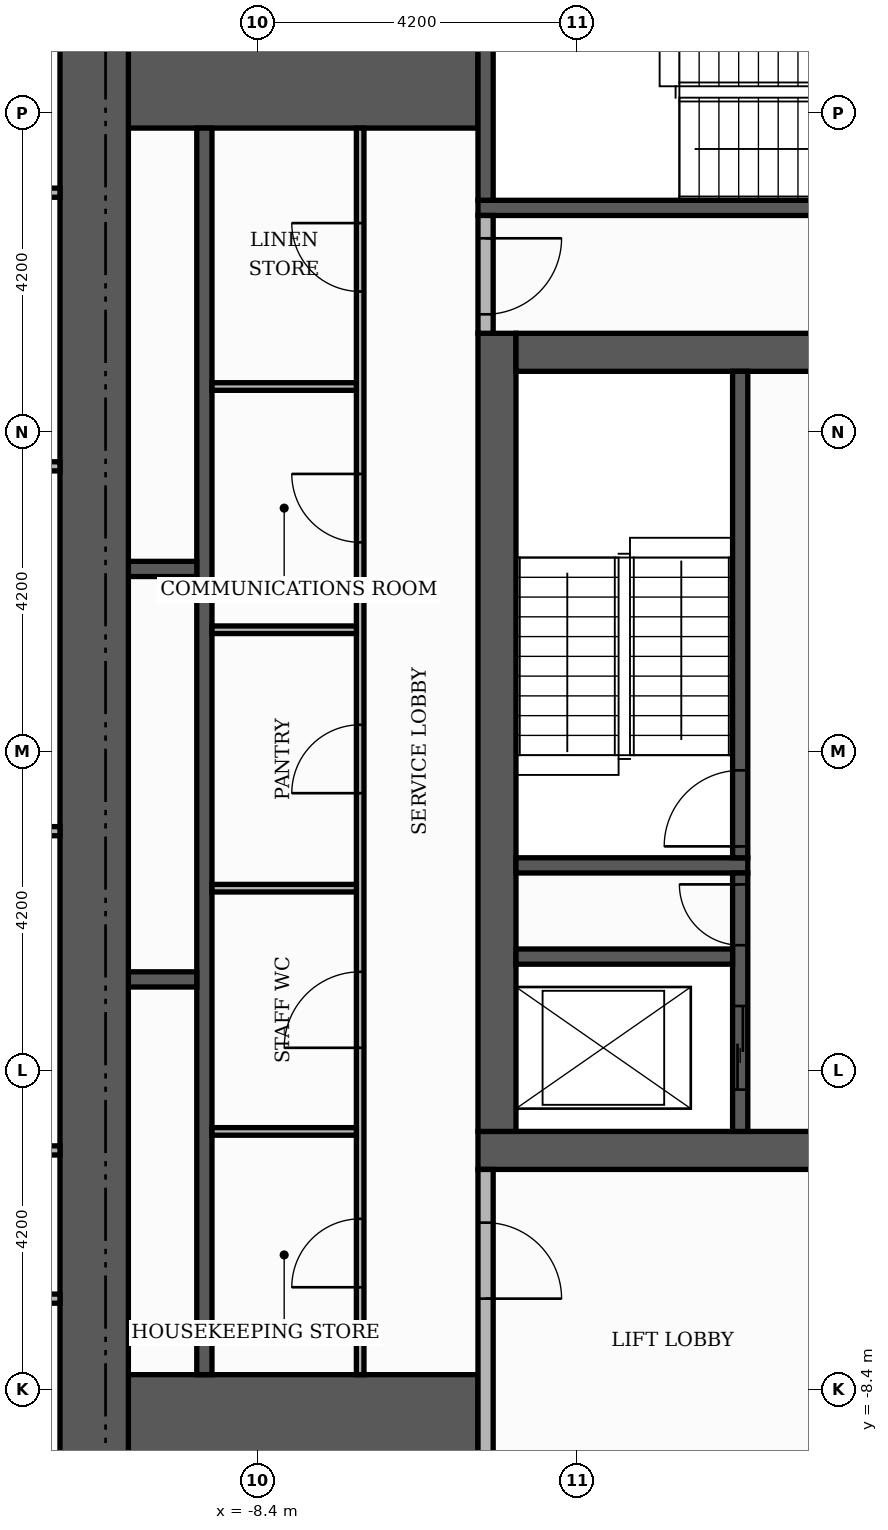
"""IFC4 building model, lengths in metres.
Left out: names, types, materials, properties, quantities, classifications, styles, units other than length and angle.
Written with IfcOpenShell. Run it as: python <this file> out.ifc"""

import sys

from ifc_helpers import new_model, si_unit, direction, frame, frame_2d, origin, place, context, subcontext, project, spatial, rectangle, extrude, element, fill, save


model = new_model("IFC4")
c1 = context("Model", 3, precision=1e-05, world=origin(), true_north=direction((0.0, 1.0)))
c2 = subcontext(c1, "Body", "Model", "MODEL_VIEW")
j1 = project(units=[si_unit("LENGTHUNIT", "METRE"), si_unit("PLANEANGLEUNIT", "RADIAN")], contexts=[c1])
p1 = place(None, origin())
s1 = spatial("IfcSite", under=j1, at=p1, CompositionType="ELEMENT")
p2 = place(p1, origin())
s2 = spatial("IfcBuilding", under=s1, at=p2, CompositionType="ELEMENT")
p3 = place(p2, frame((0.0, 0.0, 240.6)))
s3 = spatial("IfcBuildingStorey", under=s2, at=p3, CompositionType="ELEMENT", Elevation=240.6)
p4 = place(p3, frame((-5.5, -5.25, 0.0), z_axis=(0.0, 0.0, 1.0), x_axis=(1.0, 0.0, 0.0)))
e1 = element("IfcWall", 1, at=p4, inside=s3, PredefinedType="SHEAR", context=c2, shape_type="SweptSolid", body=[
    extrude(rectangle(XDim=11.0, YDim=0.5, at=frame_2d((5.5, 0.0))), origin(), (0.0, 0.0, 1.0), 3.48),
])
p5 = place(p4, frame((4.9, 0.0, 0.0)))
e2 = element("IfcOpeningElement", 2, at=p5, cuts=e1, PredefinedType="OPENING", context=c2, shape_type="SweptSolid", body=[
    extrude(rectangle(XDim=1.2, YDim=2.1, at=frame_2d((0.6, 1.05))), frame((0.0, 0.26, 0.0), z_axis=(0.0, -1.0, 0.0), x_axis=(1.0, 0.0, 0.0)), (0.0, 0.0, 1.0), 0.52),
])
p6 = place(p3, frame((-5.25, -5.0, 0.0), z_axis=(0.0, 0.0, 1.0), x_axis=(0.0, 1.0, 0.0)))
e3 = element("IfcWall", 3, at=p6, inside=s3, PredefinedType="SHEAR", context=c2, shape_type="SweptSolid", body=[
    extrude(rectangle(XDim=10.5, YDim=0.5, at=frame_2d((5.25, 0.0))), origin(), (0.0, 0.0, 1.0), 3.48),
])
p7 = place(p3, frame((-5.0, 5.25, 0.0), z_axis=(0.0, 0.0, 1.0), x_axis=(1.0, 0.0, 0.0)))
e4 = element("IfcWall", 4, at=p7, inside=s3, PredefinedType="SHEAR", context=c2, shape_type="SweptSolid", body=[
    extrude(rectangle(XDim=10.0, YDim=0.5, at=frame_2d((5.0, 0.0))), origin(), (0.0, 0.0, 1.0), 3.48),
])
p8 = place(p7, frame((4.4, 0.0, 0.0)))
e5 = element("IfcOpeningElement", 5, at=p8, cuts=e4, PredefinedType="OPENING", context=c2, shape_type="SweptSolid", body=[
    extrude(rectangle(XDim=1.2, YDim=2.1, at=frame_2d((0.6, 1.05))), frame((0.0, 0.26, 0.0), z_axis=(0.0, -1.0, 0.0), x_axis=(1.0, 0.0, 0.0)), (0.0, 0.0, 1.0), 0.52),
])
for number, where, z_axis, x_axis in (
    (6, (-10.1, -9.15, 0.0), (0.0, 0.0, 1.0), (1.0, 0.0, 0.0)),
    (7, (-10.1, 9.15, 0.0), (0.0, 0.0, 1.0), (1.0, 0.0, 0.0)),
):
    element("IfcWall", number, at=place(p3, frame(where, z_axis=z_axis, x_axis=x_axis)), inside=s3, PredefinedType="SHEAR", context=c2, shape_type="SweptSolid", body=[
        extrude(rectangle(XDim=4.6, YDim=1.9, at=frame_2d((2.3, 0.0))), origin(), (0.0, 0.0, 1.0), 3.48),
    ])
p9 = place(p3, frame((-5.0, -1.5, 0.0), z_axis=(0.0, 0.0, 1.0), x_axis=(1.0, 0.0, 0.0)))
e8 = element("IfcWall", 8, at=p9, inside=s3, PredefinedType="SHEAR", context=c2, shape_type="SweptSolid", body=[
    extrude(rectangle(XDim=3.05, YDim=0.2, at=frame_2d((1.525, 0.0))), origin(), (0.0, 0.0, 1.0), 3.48),
])
p10 = place(p3, frame((-2.05, -1.4, 0.0), z_axis=(0.0, 0.0, 1.0), x_axis=(0.0, 1.0, 0.0)))
e9 = element("IfcWall", 9, at=p10, inside=s3, PredefinedType="SHEAR", context=c2, shape_type="SweptSolid", body=[
    extrude(rectangle(XDim=6.4, YDim=0.2, at=frame_2d((3.2, 0.0))), origin(), (0.0, 0.0, 1.0), 3.48),
])
p11 = place(p10, frame((0.15, 0.0, 0.0)))
e10 = element("IfcOpeningElement", 10, at=p11, cuts=e9, PredefinedType="OPENING", context=c2, shape_type="SweptSolid", body=[
    extrude(rectangle(XDim=1.0, YDim=2.1, at=frame_2d((0.5, 1.05))), frame((0.0, 0.11, 0.0), z_axis=(0.0, -1.0, 0.0), x_axis=(1.0, 0.0, 0.0)), (0.0, 0.0, 1.0), 0.22),
])
p12 = place(p3, frame((-5.5, 7.15, 0.0), z_axis=(0.0, 0.0, 1.0), x_axis=(1.0, 0.0, 0.0)))
e11 = element("IfcWall", 11, at=p12, inside=s3, PredefinedType="SHEAR", context=c2, shape_type="SweptSolid", body=[
    extrude(rectangle(XDim=6.8, YDim=0.2, at=frame_2d((3.4, 0.0))), origin(), (0.0, 0.0, 1.0), 3.48),
])
p13 = place(p3, frame((-5.4, 7.25, 0.0), z_axis=(0.0, 0.0, 1.0), x_axis=(0.0, 1.0, 0.0)))
e12 = element("IfcWall", 12, at=p13, inside=s3, PredefinedType="SHEAR", context=c2, shape_type="SweptSolid", body=[
    extrude(rectangle(XDim=2.85, YDim=0.2, at=frame_2d((1.425, 0.0))), origin(), (0.0, 0.0, 1.0), 3.48),
])
p14 = place(p3, frame((-9.1, -8.2, 0.0), z_axis=(0.0, 0.0, 1.0), x_axis=(0.0, 1.0, 0.0)))
e13 = element("IfcWall", 13, at=p14, inside=s3, PredefinedType="SHEAR", context=c2, shape_type="SweptSolid", body=[
    extrude(rectangle(XDim=16.4, YDim=0.2, at=frame_2d((8.2, 0.0))), origin(), (0.0, 0.0, 1.0), 3.48),
])
p15 = place(p3, frame((-2.05, -5.0, 0.0), z_axis=(0.0, 0.0, 1.0), x_axis=(0.0, 1.0, 0.0)))
e14 = element("IfcWall", 14, at=p15, inside=s3, PredefinedType="SHEAR", context=c2, shape_type="SweptSolid", body=[
    extrude(rectangle(XDim=3.4, YDim=0.2, at=frame_2d((1.7, 0.0))), origin(), (0.0, 0.0, 1.0), 3.48),
])
p16 = place(p15, frame((0.55, 0.0, 0.0)))
e15 = element("IfcOpeningElement", 15, at=p16, cuts=e14, PredefinedType="OPENING", context=c2, shape_type="SweptSolid", body=[
    extrude(rectangle(XDim=1.1, YDim=2.1, at=frame_2d((0.55, 1.05))), frame((0.0, 0.11, 0.0), z_axis=(0.0, -1.0, 0.0), x_axis=(1.0, 0.0, 0.0)), (0.0, 0.0, 1.0), 0.22),
])
p17 = place(p15, frame((2.45, 0.0, 0.0)))
e16 = element("IfcOpeningElement", 16, at=p17, cuts=e14, PredefinedType="OPENING", context=c2, shape_type="SweptSolid", body=[
    extrude(rectangle(XDim=0.8, YDim=2.1, at=frame_2d((0.4, 1.05))), frame((0.0, 0.11, 0.0), z_axis=(0.0, -1.0, 0.0), x_axis=(1.0, 0.0, 0.0)), (0.0, 0.0, 1.0), 0.22),
])
p18 = place(p3, frame((-10.1, -3.0, 0.0), z_axis=(0.0, 0.0, 1.0), x_axis=(1.0, 0.0, 0.0)))
e17 = element("IfcWall", 17, at=p18, inside=s3, PredefinedType="SHEAR", context=c2, shape_type="SweptSolid", body=[
    extrude(rectangle(XDim=0.9, YDim=0.2, at=frame_2d((0.45, 0.0))), origin(), (0.0, 0.0, 1.0), 3.48),
])
p19 = place(p3, frame((-5.0, -2.7, 0.0), z_axis=(0.0, 0.0, 1.0), x_axis=(1.0, 0.0, 0.0)))
e18 = element("IfcWall", 18, at=p19, inside=s3, PredefinedType="SHEAR", context=c2, shape_type="SweptSolid", body=[
    extrude(rectangle(XDim=2.85, YDim=0.2, at=frame_2d((1.425, 0.0))), origin(), (0.0, 0.0, 1.0), 3.48),
])
p20 = place(p3, frame((-10.1, 2.4, 0.0), z_axis=(0.0, 0.0, 1.0), x_axis=(1.0, 0.0, 0.0)))
e19 = element("IfcWall", 19, at=p20, inside=s3, PredefinedType="SHEAR", context=c2, shape_type="SweptSolid", body=[
    extrude(rectangle(XDim=0.9, YDim=0.2, at=frame_2d((0.45, 0.0))), origin(), (0.0, 0.0, 1.0), 3.48),
])
p21 = place(p3, frame((-10.55, -10.1, 0.0), z_axis=(0.0, 0.0, 1.0), x_axis=(0.0, 1.0, 0.0)))
e20 = element("IfcWall", 20, at=p21, inside=s3, PredefinedType="SHEAR", context=c2, shape_type="SweptSolid", body=[
    extrude(rectangle(XDim=20.2, YDim=0.9, at=frame_2d((10.1, 0.0))), origin(), (0.0, 0.0, 1.0), 3.48),
])
p22 = place(p3, frame((-5.4, -10.1, 0.0), z_axis=(0.0, 0.0, 1.0), x_axis=(0.0, 1.0, 0.0)))
e21 = element("IfcWall", 21, at=p22, inside=s3, PredefinedType="PARTITIONING", context=c2, shape_type="SweptSolid", body=[
    extrude(rectangle(XDim=4.6, YDim=0.2, at=frame_2d((2.3, 0.0))), origin(), (0.0, 0.0, 1.0), 3.48),
])
p23 = place(p22, frame((2.9, 0.0, 0.0)))
e22 = element("IfcOpeningElement", 22, at=p23, cuts=e21, PredefinedType="OPENING", context=c2, shape_type="SweptSolid", body=[
    extrude(rectangle(XDim=1.0, YDim=2.1, at=frame_2d((0.5, 1.05))), frame((0.0, 0.11, 0.0), z_axis=(0.0, -1.0, 0.0), x_axis=(1.0, 0.0, 0.0)), (0.0, 0.0, 1.0), 0.22),
])
p24 = place(p3, frame((-7.05, -8.2, 0.0), z_axis=(0.0, 0.0, 1.0), x_axis=(0.0, 1.0, 0.0)))
e23 = element("IfcWall", 23, at=p24, inside=s3, PredefinedType="PARTITIONING", context=c2, shape_type="SweptSolid", body=[
    extrude(rectangle(XDim=16.4, YDim=0.1, at=frame_2d((8.2, 0.0))), origin(), (0.0, 0.0, 1.0), 3.48),
])
p25 = place(p24, frame((1.15, 0.0, 0.0)))
e24 = element("IfcOpeningElement", 24, at=p25, cuts=e23, PredefinedType="OPENING", context=c2, shape_type="SweptSolid", body=[
    extrude(rectangle(XDim=0.9, YDim=2.1, at=frame_2d((0.45, 1.05))), frame((0.0, 0.06, 0.0), z_axis=(0.0, -1.0, 0.0), x_axis=(1.0, 0.0, 0.0)), (0.0, 0.0, 1.0), 0.12),
])
p26 = place(p24, frame((4.3, 0.0, 0.0)))
e25 = element("IfcOpeningElement", 25, at=p26, cuts=e23, PredefinedType="OPENING", context=c2, shape_type="SweptSolid", body=[
    extrude(rectangle(XDim=1.0, YDim=2.1, at=frame_2d((0.5, 1.05))), frame((0.0, 0.06, 0.0), z_axis=(0.0, -1.0, 0.0), x_axis=(1.0, 0.0, 0.0)), (0.0, 0.0, 1.0), 0.12),
])
p27 = place(p24, frame((7.65, 0.0, 0.0)))
e26 = element("IfcOpeningElement", 26, at=p27, cuts=e23, PredefinedType="OPENING", context=c2, shape_type="SweptSolid", body=[
    extrude(rectangle(XDim=0.9, YDim=2.1, at=frame_2d((0.45, 1.05))), frame((0.0, 0.06, 0.0), z_axis=(0.0, -1.0, 0.0), x_axis=(1.0, 0.0, 0.0)), (0.0, 0.0, 1.0), 0.12),
])
p28 = place(p24, frame((10.95, 0.0, 0.0)))
e27 = element("IfcOpeningElement", 27, at=p28, cuts=e23, PredefinedType="OPENING", context=c2, shape_type="SweptSolid", body=[
    extrude(rectangle(XDim=0.9, YDim=2.1, at=frame_2d((0.45, 1.05))), frame((0.0, 0.06, 0.0), z_axis=(0.0, -1.0, 0.0), x_axis=(1.0, 0.0, 0.0)), (0.0, 0.0, 1.0), 0.12),
])
p29 = place(p24, frame((14.25, 0.0, 0.0)))
e28 = element("IfcOpeningElement", 28, at=p29, cuts=e23, PredefinedType="OPENING", context=c2, shape_type="SweptSolid", body=[
    extrude(rectangle(XDim=0.9, YDim=2.1, at=frame_2d((0.45, 1.05))), frame((0.0, 0.06, 0.0), z_axis=(0.0, -1.0, 0.0), x_axis=(1.0, 0.0, 0.0)), (0.0, 0.0, 1.0), 0.12),
])
for number, where, z_axis, x_axis in (
    (29, (-9.0, -5.0, 0.0), (0.0, 0.0, 1.0), (1.0, 0.0, 0.0)),
    (30, (-9.0, -1.8, 0.0), (0.0, 0.0, 1.0), (1.0, 0.0, 0.0)),
    (31, (-9.0, 1.6, 0.0), (0.0, 0.0, 1.0), (1.0, 0.0, 0.0)),
    (32, (-9.0, 4.8, 0.0), (0.0, 0.0, 1.0), (1.0, 0.0, 0.0)),
):
    element("IfcWall", number, at=place(p3, frame(where, z_axis=z_axis, x_axis=x_axis)), inside=s3, PredefinedType="PARTITIONING", context=c2, shape_type="SweptSolid", body=[
        extrude(rectangle(XDim=1.9, YDim=0.1, at=frame_2d((0.95, 0.0))), origin(), (0.0, 0.0, 1.0), 3.48),
    ])
p30 = place(p3, frame((-5.4, 5.5, 0.0), z_axis=(0.0, 0.0, 1.0), x_axis=(0.0, 1.0, 0.0)))
e33 = element("IfcWall", 33, at=p30, inside=s3, PredefinedType="PARTITIONING", context=c2, shape_type="SweptSolid", body=[
    extrude(rectangle(XDim=1.55, YDim=0.2, at=frame_2d((0.775, 0.0))), origin(), (0.0, 0.0, 1.0), 3.48),
])
p31 = place(p30, frame((0.25, 0.0, 0.0)))
e34 = element("IfcOpeningElement", 34, at=p31, cuts=e33, PredefinedType="OPENING", context=c2, shape_type="SweptSolid", body=[
    extrude(rectangle(XDim=1.0, YDim=2.1, at=frame_2d((0.5, 1.05))), frame((0.0, 0.11, 0.0), z_axis=(0.0, -1.0, 0.0), x_axis=(1.0, 0.0, 0.0)), (0.0, 0.0, 1.0), 0.22),
])
for number, where, z_axis, x_axis in (
    (35, (-18.32, -7.2, 0.0), (0.0, 0.0, 1.0), (1.0, 0.0, 0.0)),
    (36, (-18.32, -5.25, 0.0), (0.0, 0.0, 1.0), (1.0, 0.0, 0.0)),
    (37, (-18.32, -1.05, 0.0), (0.0, 0.0, 1.0), (1.0, 0.0, 0.0)),
    (38, (-18.32, 3.75, 0.0), (0.0, 0.0, 1.0), (1.0, 0.0, 0.0)),
):
    element("IfcWall", number, at=place(p3, frame(where, z_axis=z_axis, x_axis=x_axis)), inside=s3, PredefinedType="PARTITIONING", context=c2, shape_type="SweptSolid", body=[
        extrude(rectangle(XDim=7.32, YDim=0.12, at=frame_2d((3.66, 0.0))), origin(), (0.0, 0.0, 1.0), 3.48),
    ])
p32 = place(p3, frame((-18.32, 7.35, 0.0), z_axis=(0.0, 0.0, 1.0), x_axis=(1.0, 0.0, 0.0)))
e39 = element("IfcWall", 39, at=p32, inside=s3, PredefinedType="PARTITIONING", context=c2, shape_type="SweptSolid", body=[
    extrude(rectangle(XDim=7.32, YDim=0.12, at=frame_2d((3.66, 0.0))), origin(), (0.0, 0.0, 1.0), 3.48),
])
p33 = place(p32, frame((3.21, 0.0, 0.0)))
e40 = element("IfcOpeningElement", 40, at=p33, cuts=e39, PredefinedType="OPENING", context=c2, shape_type="SweptSolid", body=[
    extrude(rectangle(XDim=0.9, YDim=2.1, at=frame_2d((0.45, 1.05))), frame((0.0, 0.07, 0.0), z_axis=(0.0, -1.0, 0.0), x_axis=(1.0, 0.0, 0.0)), (0.0, 0.0, 1.0), 0.14),
])
p34 = place(p16, origin())
e41 = element("IfcDoor", 41, at=p34, inside=s3, OperationType="SLIDING_TO_LEFT", PredefinedType="DOOR", context=c2, shape_type="SweptSolid", body=[
    extrude(rectangle(XDim=1.1, YDim=2.1, at=frame_2d((0.55, 1.05))), frame((0.0, 0.025, 0.0), z_axis=(0.0, -1.0, 0.0), x_axis=(1.0, 0.0, 0.0)), (0.0, 0.0, 1.0), 0.05),
])
fill(e15, e41)
p35 = place(p11, origin())
e42 = element("IfcDoor", 42, at=p35, inside=s3, OperationType="SINGLE_SWING_LEFT", PredefinedType="DOOR", context=c2, shape_type="SweptSolid", body=[
    extrude(rectangle(XDim=1.0, YDim=2.1, at=frame_2d((0.5, 1.05))), frame((0.0, 0.025, 0.0), z_axis=(0.0, -1.0, 0.0), x_axis=(1.0, 0.0, 0.0)), (0.0, 0.0, 1.0), 0.05),
])
fill(e10, e42)
p36 = place(p17, origin())
e43 = element("IfcDoor", 43, at=p36, inside=s3, OperationType="SINGLE_SWING_RIGHT", PredefinedType="DOOR", context=c2, shape_type="SweptSolid", body=[
    extrude(rectangle(XDim=0.8, YDim=2.1, at=frame_2d((0.4, 1.05))), frame((0.0, 0.025, 0.0), z_axis=(0.0, -1.0, 0.0), x_axis=(1.0, 0.0, 0.0)), (0.0, 0.0, 1.0), 0.05),
])
fill(e16, e43)
p37 = place(p31, frame((1.0, 0.0, 0.0), z_axis=(0.0, 0.0, 1.0), x_axis=(-1.0, 0.0, 0.0)))
e44 = element("IfcDoor", 44, at=p37, inside=s3, OperationType="SINGLE_SWING_RIGHT", PredefinedType="DOOR", context=c2, shape_type="SweptSolid", body=[
    extrude(rectangle(XDim=1.0, YDim=2.1, at=frame_2d((0.5, 1.05))), frame((0.0, 0.025, 0.0), z_axis=(0.0, -1.0, 0.0), x_axis=(1.0, 0.0, 0.0)), (0.0, 0.0, 1.0), 0.05),
])
fill(e34, e44)
p38 = place(p23, frame((1.0, 0.0, 0.0), z_axis=(0.0, 0.0, 1.0), x_axis=(-1.0, 0.0, 0.0)))
e45 = element("IfcDoor", 45, at=p38, inside=s3, OperationType="SINGLE_SWING_LEFT", PredefinedType="DOOR", context=c2, shape_type="SweptSolid", body=[
    extrude(rectangle(XDim=1.0, YDim=2.1, at=frame_2d((0.5, 1.05))), frame((0.0, 0.025, 0.0), z_axis=(0.0, -1.0, 0.0), x_axis=(1.0, 0.0, 0.0)), (0.0, 0.0, 1.0), 0.05),
])
fill(e22, e45)
p39 = place(p25, origin())
e46 = element("IfcDoor", 46, at=p39, inside=s3, OperationType="SINGLE_SWING_LEFT", PredefinedType="DOOR", context=c2, shape_type="SweptSolid", body=[
    extrude(rectangle(XDim=0.9, YDim=2.1, at=frame_2d((0.45, 1.05))), frame((0.0, 0.025, 0.0), z_axis=(0.0, -1.0, 0.0), x_axis=(1.0, 0.0, 0.0)), (0.0, 0.0, 1.0), 0.05),
])
fill(e24, e46)
p40 = place(p26, origin())
e47 = element("IfcDoor", 47, at=p40, inside=s3, OperationType="SINGLE_SWING_LEFT", PredefinedType="DOOR", context=c2, shape_type="SweptSolid", body=[
    extrude(rectangle(XDim=1.0, YDim=2.1, at=frame_2d((0.5, 1.05))), frame((0.0, 0.025, 0.0), z_axis=(0.0, -1.0, 0.0), x_axis=(1.0, 0.0, 0.0)), (0.0, 0.0, 1.0), 0.05),
])
fill(e25, e47)
p41 = place(p27, origin())
e48 = element("IfcDoor", 48, at=p41, inside=s3, OperationType="SINGLE_SWING_LEFT", PredefinedType="DOOR", context=c2, shape_type="SweptSolid", body=[
    extrude(rectangle(XDim=0.9, YDim=2.1, at=frame_2d((0.45, 1.05))), frame((0.0, 0.025, 0.0), z_axis=(0.0, -1.0, 0.0), x_axis=(1.0, 0.0, 0.0)), (0.0, 0.0, 1.0), 0.05),
])
fill(e26, e48)
p42 = place(p28, origin())
e49 = element("IfcDoor", 49, at=p42, inside=s3, OperationType="SINGLE_SWING_RIGHT", PredefinedType="DOOR", context=c2, shape_type="SweptSolid", body=[
    extrude(rectangle(XDim=0.9, YDim=2.1, at=frame_2d((0.45, 1.05))), frame((0.0, 0.025, 0.0), z_axis=(0.0, -1.0, 0.0), x_axis=(1.0, 0.0, 0.0)), (0.0, 0.0, 1.0), 0.05),
])
fill(e27, e49)
p43 = place(p29, origin())
e50 = element("IfcDoor", 50, at=p43, inside=s3, OperationType="SINGLE_SWING_RIGHT", PredefinedType="DOOR", context=c2, shape_type="SweptSolid", body=[
    extrude(rectangle(XDim=0.9, YDim=2.1, at=frame_2d((0.45, 1.05))), frame((0.0, 0.025, 0.0), z_axis=(0.0, -1.0, 0.0), x_axis=(1.0, 0.0, 0.0)), (0.0, 0.0, 1.0), 0.05),
])
fill(e28, e50)
save(model, sys.argv[1])
